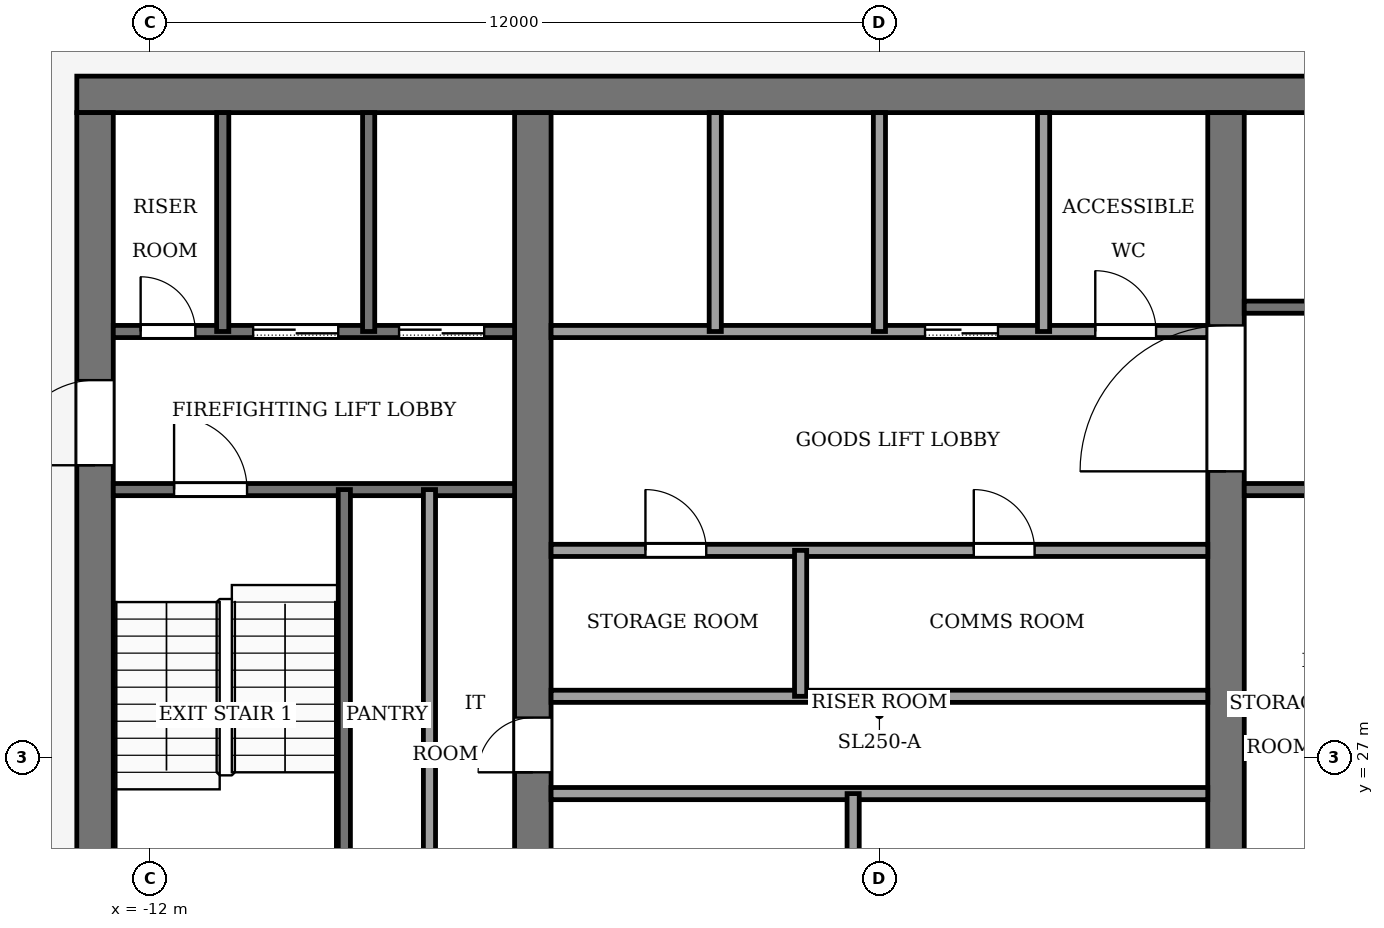
"""IFC4 building model, lengths in metres.
Left out: names, types, materials, properties, quantities, classifications, styles, units other than length and angle.
Written with IfcOpenShell. Run it as: python <this file> out.ifc"""

import sys

from ifc_helpers import new_model, si_unit, direction, frame, frame_2d, origin, place, context, subcontext, project, spatial, rectangle, extrude, element, fill, save


model = new_model("IFC4")
c1 = context("Model", 3, precision=1e-05, world=origin(), true_north=direction((0.0, 1.0)))
c2 = subcontext(c1, "Body", "Model", "MODEL_VIEW")
j1 = project(units=[si_unit("LENGTHUNIT", "METRE"), si_unit("PLANEANGLEUNIT", "RADIAN")], contexts=[c1])
p1 = place(None, origin())
s1 = spatial("IfcSite", under=j1, at=p1, CompositionType="ELEMENT")
p2 = place(p1, origin())
s2 = spatial("IfcBuilding", under=s1, at=p2, CompositionType="ELEMENT")
p3 = place(p2, frame((0.0, 0.0, 326.0)))
s3 = spatial("IfcBuildingStorey", under=s2, at=p3, CompositionType="ELEMENT", Elevation=326.0)
p4 = place(p3, frame((-13.2, 37.9, -0.13), z_axis=(0.0, 0.0, 1.0), x_axis=(1.0, 0.0, 0.0)))
e1 = element("IfcWall", 1, at=p4, inside=s3, PredefinedType="SHEAR", context=c2, shape_type="SweptSolid", body=[
    extrude(rectangle(XDim=26.4, YDim=0.6, at=frame_2d((13.2, 0.0))), origin(), (0.0, 0.0, 1.0), 4.0),
])
p5 = place(p3, frame((-12.9, 18.4, -0.13), z_axis=(0.0, 0.0, 1.0), x_axis=(0.0, 1.0, 0.0)))
e2 = element("IfcWall", 2, at=p5, inside=s3, PredefinedType="SHEAR", context=c2, shape_type="SweptSolid", body=[
    extrude(rectangle(XDim=19.2, YDim=0.6, at=frame_2d((9.6, 0.0))), origin(), (0.0, 0.0, 1.0), 4.0),
])
p6 = place(p5, frame((2.8, 0.0, 0.13)))
e3 = element("IfcOpeningElement", 3, at=p6, cuts=e2, PredefinedType="OPENING", context=c2, shape_type="SweptSolid", body=[
    extrude(rectangle(XDim=2.4, YDim=2.4, at=frame_2d((1.2, 1.2))), frame((0.0, 0.31, 0.0), z_axis=(0.0, -1.0, 0.0), x_axis=(1.0, 0.0, 0.0)), (0.0, 0.0, 1.0), 0.62),
])
p7 = place(p5, frame((13.4, 0.0, 0.13)))
e4 = element("IfcOpeningElement", 4, at=p7, cuts=e2, PredefinedType="OPENING", context=c2, shape_type="SweptSolid", body=[
    extrude(rectangle(XDim=1.4, YDim=2.2, at=frame_2d((0.7, 1.1))), frame((0.0, 0.31, 0.0), z_axis=(0.0, -1.0, 0.0), x_axis=(1.0, 0.0, 0.0)), (0.0, 0.0, 1.0), 0.62),
])
p8 = place(p3, frame((-5.7, 18.4, -0.13), z_axis=(0.0, 0.0, 1.0), x_axis=(0.0, 1.0, 0.0)))
e5 = element("IfcWall", 5, at=p8, inside=s3, PredefinedType="SHEAR", context=c2, shape_type="SweptSolid", body=[
    extrude(rectangle(XDim=19.2, YDim=0.6, at=frame_2d((9.6, 0.0))), origin(), (0.0, 0.0, 1.0), 4.0),
])
p9 = place(p8, frame((8.35, 0.0, 0.13)))
e6 = element("IfcOpeningElement", 6, at=p9, cuts=e5, PredefinedType="OPENING", context=c2, shape_type="SweptSolid", body=[
    extrude(rectangle(XDim=0.9, YDim=2.1, at=frame_2d((0.45, 1.05))), frame((0.0, 0.31, 0.0), z_axis=(0.0, -1.0, 0.0), x_axis=(1.0, 0.0, 0.0)), (0.0, 0.0, 1.0), 0.62),
])
p10 = place(p3, frame((5.7, 18.4, -0.13), z_axis=(0.0, 0.0, 1.0), x_axis=(0.0, 1.0, 0.0)))
e7 = element("IfcWall", 7, at=p10, inside=s3, PredefinedType="SHEAR", context=c2, shape_type="SweptSolid", body=[
    extrude(rectangle(XDim=19.2, YDim=0.6, at=frame_2d((9.6, 0.0))), origin(), (0.0, 0.0, 1.0), 4.0),
])
p11 = place(p10, frame((13.3, 0.0, 0.13)))
e8 = element("IfcOpeningElement", 8, at=p11, cuts=e7, PredefinedType="OPENING", context=c2, shape_type="SweptSolid", body=[
    extrude(rectangle(XDim=2.4, YDim=2.4, at=frame_2d((1.2, 1.2))), frame((0.0, 0.31, 0.0), z_axis=(0.0, -1.0, 0.0), x_axis=(1.0, 0.0, 0.0)), (0.0, 0.0, 1.0), 0.62),
])
for number, where, z_axis, x_axis in (
    (9, (-5.4, 26.4, 0.0), (0.0, 0.0, 1.0), (1.0, 0.0, 0.0)),
    (10, (-5.4, 28.0, 0.0), (0.0, 0.0, 1.0), (1.0, 0.0, 0.0)),
):
    element("IfcWall", number, at=place(p3, frame(where, z_axis=z_axis, x_axis=x_axis)), inside=s3, PredefinedType="PARTITIONING", context=c2, shape_type="SweptSolid", body=[
        extrude(rectangle(XDim=10.8, YDim=0.2, at=frame_2d((5.4, 0.0))), origin(), (0.0, 0.0, 1.0), 3.87),
    ])
p12 = place(p3, frame((-5.4, 30.4, 0.0), z_axis=(0.0, 0.0, 1.0), x_axis=(1.0, 0.0, 0.0)))
e11 = element("IfcWall", 11, at=p12, inside=s3, PredefinedType="PARTITIONING", context=c2, shape_type="SweptSolid", body=[
    extrude(rectangle(XDim=10.8, YDim=0.2, at=frame_2d((5.4, 0.0))), origin(), (0.0, 0.0, 1.0), 3.87),
])
p13 = place(p12, frame((1.552, 0.0, 0.0)))
e12 = element("IfcOpeningElement", 12, at=p13, cuts=e11, PredefinedType="OPENING", context=c2, shape_type="SweptSolid", body=[
    extrude(rectangle(XDim=1.0, YDim=2.1, at=frame_2d((0.5, 1.05))), frame((0.0, 0.11, 0.0), z_axis=(0.0, -1.0, 0.0), x_axis=(1.0, 0.0, 0.0)), (0.0, 0.0, 1.0), 0.22),
])
p14 = place(p12, frame((6.952, 0.0, 0.0)))
e13 = element("IfcOpeningElement", 13, at=p14, cuts=e11, PredefinedType="OPENING", context=c2, shape_type="SweptSolid", body=[
    extrude(rectangle(XDim=1.0, YDim=2.1, at=frame_2d((0.5, 1.05))), frame((0.0, 0.11, 0.0), z_axis=(0.0, -1.0, 0.0), x_axis=(1.0, 0.0, 0.0)), (0.0, 0.0, 1.0), 0.22),
])
p15 = place(p3, frame((-12.6, 31.4, 0.0), z_axis=(0.0, 0.0, 1.0), x_axis=(1.0, 0.0, 0.0)))
e14 = element("IfcWall", 14, at=p15, inside=s3, PredefinedType="PARTITIONING", context=c2, shape_type="SweptSolid", body=[
    extrude(rectangle(XDim=6.6, YDim=0.2, at=frame_2d((3.3, 0.0))), origin(), (0.0, 0.0, 1.0), 3.87),
])
p16 = place(p15, frame((1.0, 0.0, 0.0)))
e15 = element("IfcOpeningElement", 15, at=p16, cuts=e14, PredefinedType="OPENING", context=c2, shape_type="SweptSolid", body=[
    extrude(rectangle(XDim=1.2, YDim=2.2, at=frame_2d((0.6, 1.1))), frame((0.0, 0.11, 0.0), z_axis=(0.0, -1.0, 0.0), x_axis=(1.0, 0.0, 0.0)), (0.0, 0.0, 1.0), 0.22),
])
p17 = place(p3, frame((6.0, 31.4, 0.0), z_axis=(0.0, 0.0, 1.0), x_axis=(1.0, 0.0, 0.0)))
e16 = element("IfcWall", 16, at=p17, inside=s3, PredefinedType="PARTITIONING", context=c2, shape_type="SweptSolid", body=[
    extrude(rectangle(XDim=6.6, YDim=0.2, at=frame_2d((3.3, 0.0))), origin(), (0.0, 0.0, 1.0), 3.87),
])
p18 = place(p3, frame((-12.6, 34.0, 0.0), z_axis=(0.0, 0.0, 1.0), x_axis=(1.0, 0.0, 0.0)))
e17 = element("IfcWall", 17, at=p18, inside=s3, PredefinedType="PARTITIONING", context=c2, shape_type="SweptSolid", body=[
    extrude(rectangle(XDim=6.6, YDim=0.2, at=frame_2d((3.3, 0.0))), origin(), (0.0, 0.0, 1.0), 3.87),
])
p19 = place(p18, frame((4.7, 0.0, 0.0)))
e18 = element("IfcOpeningElement", 18, at=p19, cuts=e17, PredefinedType="OPENING", context=c2, shape_type="SweptSolid", body=[
    extrude(rectangle(XDim=1.4, YDim=2.2, at=frame_2d((0.7, 1.1))), frame((0.0, 0.11, 0.0), z_axis=(0.0, -1.0, 0.0), x_axis=(1.0, 0.0, 0.0)), (0.0, 0.0, 1.0), 0.22),
])
p20 = place(p18, frame((2.3, 0.0, 0.0)))
e19 = element("IfcOpeningElement", 19, at=p20, cuts=e17, PredefinedType="OPENING", context=c2, shape_type="SweptSolid", body=[
    extrude(rectangle(XDim=1.4, YDim=2.2, at=frame_2d((0.7, 1.1))), frame((0.0, 0.11, 0.0), z_axis=(0.0, -1.0, 0.0), x_axis=(1.0, 0.0, 0.0)), (0.0, 0.0, 1.0), 0.22),
])
p21 = place(p18, frame((0.45, 0.0, 0.0)))
e20 = element("IfcOpeningElement", 20, at=p21, cuts=e17, PredefinedType="OPENING", context=c2, shape_type="SweptSolid", body=[
    extrude(rectangle(XDim=0.9, YDim=2.1, at=frame_2d((0.45, 1.05))), frame((0.0, 0.11, 0.0), z_axis=(0.0, -1.0, 0.0), x_axis=(1.0, 0.0, 0.0)), (0.0, 0.0, 1.0), 0.22),
])
p22 = place(p3, frame((-5.4, 34.0, 0.0), z_axis=(0.0, 0.0, 1.0), x_axis=(1.0, 0.0, 0.0)))
e21 = element("IfcWall", 21, at=p22, inside=s3, PredefinedType="PARTITIONING", context=c2, shape_type="SweptSolid", body=[
    extrude(rectangle(XDim=10.8, YDim=0.2, at=frame_2d((5.4, 0.0))), origin(), (0.0, 0.0, 1.0), 3.87),
])
p23 = place(p22, frame((6.15, 0.0, 0.0)))
e22 = element("IfcOpeningElement", 22, at=p23, cuts=e21, PredefinedType="OPENING", context=c2, shape_type="SweptSolid", body=[
    extrude(rectangle(XDim=1.2, YDim=2.2, at=frame_2d((0.6, 1.1))), frame((0.0, 0.11, 0.0), z_axis=(0.0, -1.0, 0.0), x_axis=(1.0, 0.0, 0.0)), (0.0, 0.0, 1.0), 0.22),
])
p24 = place(p22, frame((8.95, 0.0, 0.0)))
e23 = element("IfcOpeningElement", 23, at=p24, cuts=e21, PredefinedType="OPENING", context=c2, shape_type="SweptSolid", body=[
    extrude(rectangle(XDim=1.0, YDim=2.1, at=frame_2d((0.5, 1.05))), frame((0.0, 0.11, 0.0), z_axis=(0.0, -1.0, 0.0), x_axis=(1.0, 0.0, 0.0)), (0.0, 0.0, 1.0), 0.22),
])
p25 = place(p3, frame((6.0, 34.4, 0.0), z_axis=(0.0, 0.0, 1.0), x_axis=(1.0, 0.0, 0.0)))
e24 = element("IfcWall", 24, at=p25, inside=s3, PredefinedType="PARTITIONING", context=c2, shape_type="SweptSolid", body=[
    extrude(rectangle(XDim=6.6, YDim=0.2, at=frame_2d((3.3, 0.0))), origin(), (0.0, 0.0, 1.0), 3.87),
])
p26 = place(p25, frame((4.8, 0.0, 0.0)))
e25 = element("IfcOpeningElement", 25, at=p26, cuts=e24, PredefinedType="OPENING", context=c2, shape_type="SweptSolid", body=[
    extrude(rectangle(XDim=1.2, YDim=2.2, at=frame_2d((0.6, 1.1))), frame((0.0, 0.11, 0.0), z_axis=(0.0, -1.0, 0.0), x_axis=(1.0, 0.0, 0.0)), (0.0, 0.0, 1.0), 0.22),
])
p27 = place(p3, frame((-10.8, 34.0, 0.0), z_axis=(0.0, 0.0, 1.0), x_axis=(0.0, 1.0, 0.0)))
e26 = element("IfcWall", 26, at=p27, inside=s3, PredefinedType="PARTITIONING", context=c2, shape_type="SweptSolid", body=[
    extrude(rectangle(XDim=3.6, YDim=0.2, at=frame_2d((1.8, 0.0))), origin(), (0.0, 0.0, 1.0), 3.87),
])
p28 = place(p3, frame((-8.8, 24.0, 0.0), z_axis=(0.0, 0.0, 1.0), x_axis=(0.0, 1.0, 0.0)))
e27 = element("IfcWall", 27, at=p28, inside=s3, PredefinedType="PARTITIONING", context=c2, shape_type="SweptSolid", body=[
    extrude(rectangle(XDim=7.4, YDim=0.2, at=frame_2d((3.7, 0.0))), origin(), (0.0, 0.0, 1.0), 3.87),
])
p29 = place(p3, frame((-8.4, 34.0, 0.0), z_axis=(0.0, 0.0, 1.0), x_axis=(0.0, 1.0, 0.0)))
e28 = element("IfcWall", 28, at=p29, inside=s3, PredefinedType="PARTITIONING", context=c2, shape_type="SweptSolid", body=[
    extrude(rectangle(XDim=3.6, YDim=0.2, at=frame_2d((1.8, 0.0))), origin(), (0.0, 0.0, 1.0), 3.87),
])
p30 = place(p3, frame((-7.4, 24.0, 0.0), z_axis=(0.0, 0.0, 1.0), x_axis=(0.0, 1.0, 0.0)))
e29 = element("IfcWall", 29, at=p30, inside=s3, PredefinedType="PARTITIONING", context=c2, shape_type="SweptSolid", body=[
    extrude(rectangle(XDim=7.4, YDim=0.2, at=frame_2d((3.7, 0.0))), origin(), (0.0, 0.0, 1.0), 3.87),
])
p31 = place(p3, frame((-2.7, 34.0, 0.0), z_axis=(0.0, 0.0, 1.0), x_axis=(0.0, 1.0, 0.0)))
e30 = element("IfcWall", 30, at=p31, inside=s3, PredefinedType="PARTITIONING", context=c2, shape_type="SweptSolid", body=[
    extrude(rectangle(XDim=3.6, YDim=0.2, at=frame_2d((1.8, 0.0))), origin(), (0.0, 0.0, 1.0), 3.87),
])
for number, where, z_axis, x_axis in (
    (31, (-1.296, 28.0, 0.0), (0.0, 0.0, 1.0), (0.0, 1.0, 0.0)),
    (32, (-0.432, 24.0, 0.0), (0.0, 0.0, 1.0), (0.0, 1.0, 0.0)),
):
    element("IfcWall", number, at=place(p3, frame(where, z_axis=z_axis, x_axis=x_axis)), inside=s3, PredefinedType="PARTITIONING", context=c2, shape_type="SweptSolid", body=[
        extrude(rectangle(XDim=2.4, YDim=0.2, at=frame_2d((1.2, 0.0))), origin(), (0.0, 0.0, 1.0), 3.87),
    ])
for number, where, z_axis, x_axis in (
    (33, (0.0, 34.0, 0.0), (0.0, 0.0, 1.0), (0.0, 1.0, 0.0)),
    (34, (2.7, 34.0, 0.0), (0.0, 0.0, 1.0), (0.0, 1.0, 0.0)),
):
    element("IfcWall", number, at=place(p3, frame(where, z_axis=z_axis, x_axis=x_axis)), inside=s3, PredefinedType="PARTITIONING", context=c2, shape_type="SweptSolid", body=[
        extrude(rectangle(XDim=3.6, YDim=0.2, at=frame_2d((1.8, 0.0))), origin(), (0.0, 0.0, 1.0), 3.87),
    ])
p32 = place(p23, origin())
e35 = element("IfcDoor", 35, at=p32, inside=s3, OperationType="SLIDING_TO_LEFT", PredefinedType="DOOR", context=c2, shape_type="SweptSolid", body=[
    extrude(rectangle(XDim=1.2, YDim=2.2, at=frame_2d((0.6, 1.1))), frame((0.0, 0.025, 0.0), z_axis=(0.0, -1.0, 0.0), x_axis=(1.0, 0.0, 0.0)), (0.0, 0.0, 1.0), 0.05),
])
fill(e22, e35)
p33 = place(p19, origin())
e36 = element("IfcDoor", 36, at=p33, inside=s3, OperationType="SLIDING_TO_LEFT", PredefinedType="DOOR", context=c2, shape_type="SweptSolid", body=[
    extrude(rectangle(XDim=1.4, YDim=2.2, at=frame_2d((0.7, 1.1))), frame((0.0, 0.025, 0.0), z_axis=(0.0, -1.0, 0.0), x_axis=(1.0, 0.0, 0.0)), (0.0, 0.0, 1.0), 0.05),
])
fill(e18, e36)
p34 = place(p20, origin())
e37 = element("IfcDoor", 37, at=p34, inside=s3, OperationType="SLIDING_TO_LEFT", PredefinedType="DOOR", context=c2, shape_type="SweptSolid", body=[
    extrude(rectangle(XDim=1.4, YDim=2.2, at=frame_2d((0.7, 1.1))), frame((0.0, 0.025, 0.0), z_axis=(0.0, -1.0, 0.0), x_axis=(1.0, 0.0, 0.0)), (0.0, 0.0, 1.0), 0.05),
])
fill(e19, e37)
p35 = place(p21, origin())
e38 = element("IfcDoor", 38, at=p35, inside=s3, OperationType="SINGLE_SWING_RIGHT", PredefinedType="DOOR", context=c2, shape_type="SweptSolid", body=[
    extrude(rectangle(XDim=0.9, YDim=2.1, at=frame_2d((0.45, 1.05))), frame((0.0, 0.025, 0.0), z_axis=(0.0, -1.0, 0.0), x_axis=(1.0, 0.0, 0.0)), (0.0, 0.0, 1.0), 0.05),
])
fill(e20, e38)
p36 = place(p13, origin())
e39 = element("IfcDoor", 39, at=p36, inside=s3, OperationType="SINGLE_SWING_LEFT", PredefinedType="DOOR", context=c2, shape_type="SweptSolid", body=[
    extrude(rectangle(XDim=1.0, YDim=2.1, at=frame_2d((0.5, 1.05))), frame((0.0, 0.025, 0.0), z_axis=(0.0, -1.0, 0.0), x_axis=(1.0, 0.0, 0.0)), (0.0, 0.0, 1.0), 0.05),
])
fill(e12, e39)
p37 = place(p14, origin())
e40 = element("IfcDoor", 40, at=p37, inside=s3, OperationType="SINGLE_SWING_RIGHT", PredefinedType="DOOR", context=c2, shape_type="SweptSolid", body=[
    extrude(rectangle(XDim=1.0, YDim=2.1, at=frame_2d((0.5, 1.05))), frame((0.0, 0.025, 0.0), z_axis=(0.0, -1.0, 0.0), x_axis=(1.0, 0.0, 0.0)), (0.0, 0.0, 1.0), 0.05),
])
fill(e13, e40)
p38 = place(p24, origin())
e41 = element("IfcDoor", 41, at=p38, inside=s3, OperationType="SINGLE_SWING_LEFT", PredefinedType="DOOR", context=c2, shape_type="SweptSolid", body=[
    extrude(rectangle(XDim=1.0, YDim=2.1, at=frame_2d((0.5, 1.05))), frame((0.0, 0.025, 0.0), z_axis=(0.0, -1.0, 0.0), x_axis=(1.0, 0.0, 0.0)), (0.0, 0.0, 1.0), 0.05),
])
fill(e23, e41)
p39 = place(p9, origin())
e42 = element("IfcDoor", 42, at=p39, inside=s3, OperationType="SINGLE_SWING_RIGHT", PredefinedType="DOOR", context=c2, shape_type="SweptSolid", body=[
    extrude(rectangle(XDim=0.9, YDim=2.1, at=frame_2d((0.45, 1.05))), frame((0.0, 0.025, 0.0), z_axis=(0.0, -1.0, 0.0), x_axis=(1.0, 0.0, 0.0)), (0.0, 0.0, 1.0), 0.05),
])
fill(e6, e42)
p40 = place(p16, origin())
e43 = element("IfcDoor", 43, at=p40, inside=s3, OperationType="SINGLE_SWING_RIGHT", PredefinedType="DOOR", context=c2, shape_type="SweptSolid", body=[
    extrude(rectangle(XDim=1.2, YDim=2.2, at=frame_2d((0.6, 1.1))), frame((0.0, 0.025, 0.0), z_axis=(0.0, -1.0, 0.0), x_axis=(1.0, 0.0, 0.0)), (0.0, 0.0, 1.0), 0.05),
])
fill(e15, e43)
p41 = place(p11, origin())
e44 = element("IfcDoor", 44, at=p41, inside=s3, OperationType="DOUBLE_DOOR_SINGLE_SWING", PredefinedType="DOOR", context=c2, shape_type="SweptSolid", body=[
    extrude(rectangle(XDim=2.4, YDim=2.4, at=frame_2d((1.2, 1.2))), frame((0.0, 0.025, 0.0), z_axis=(0.0, -1.0, 0.0), x_axis=(1.0, 0.0, 0.0)), (0.0, 0.0, 1.0), 0.05),
])
fill(e8, e44)
p42 = place(p7, origin())
e45 = element("IfcDoor", 45, at=p42, inside=s3, OperationType="SINGLE_SWING_RIGHT", PredefinedType="DOOR", context=c2, shape_type="SweptSolid", body=[
    extrude(rectangle(XDim=1.4, YDim=2.2, at=frame_2d((0.7, 1.1))), frame((0.0, 0.025, 0.0), z_axis=(0.0, -1.0, 0.0), x_axis=(1.0, 0.0, 0.0)), (0.0, 0.0, 1.0), 0.05),
])
fill(e4, e45)
save(model, sys.argv[1])
